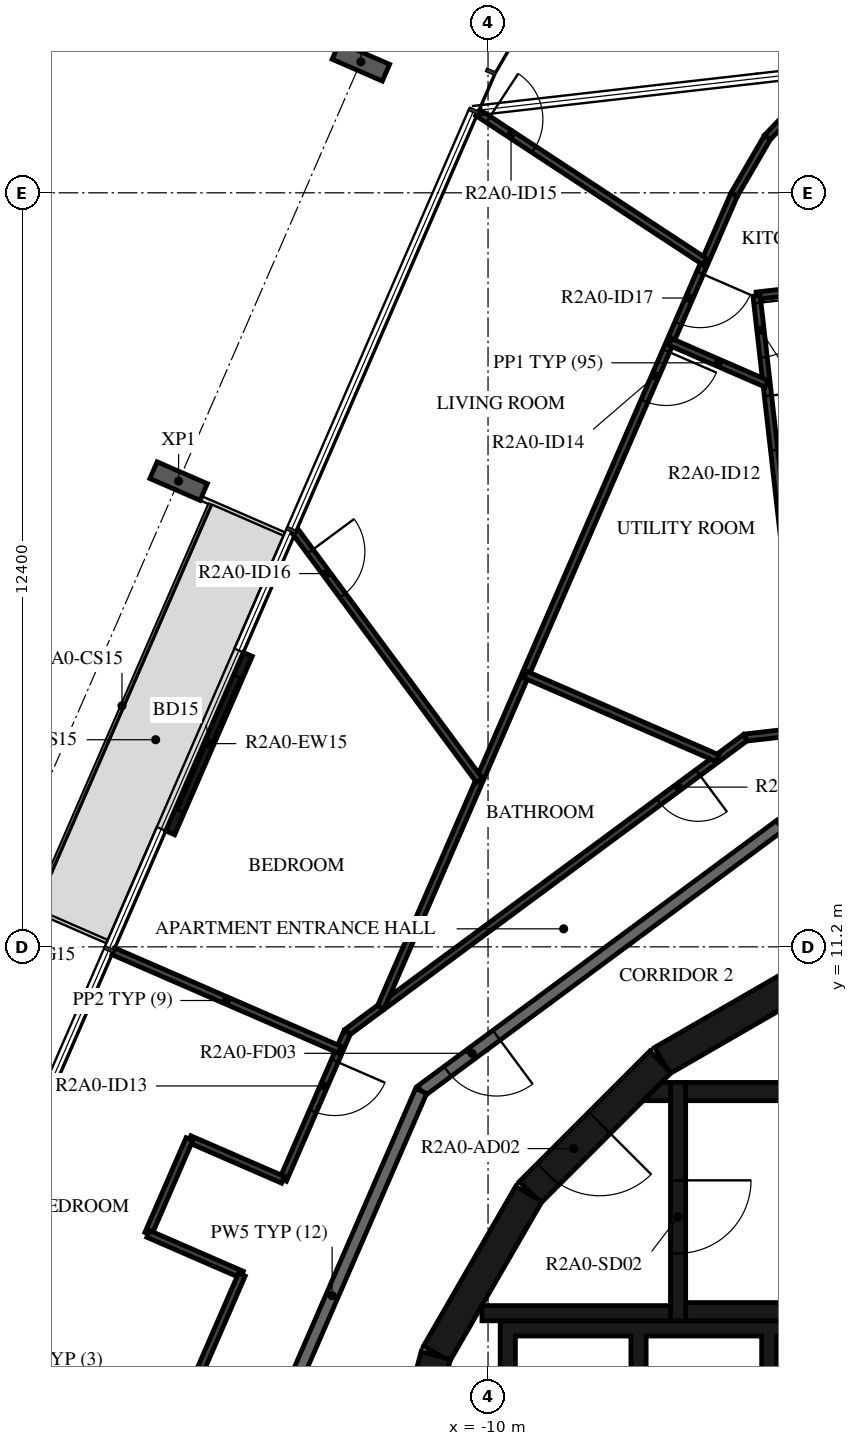
"""IFC4 building model, lengths in metres.
Left out: names, types, materials, properties, quantities, classifications, styles, units other than length and angle.
Written with IfcOpenShell. Run it as: python <this file> out.ifc"""

import sys

from ifc_helpers import new_model, si_unit, direction, frame, frame_2d, origin, origin_2d, place, context, subcontext, project, spatial, polyline, rectangle, i_section, outline, extrude, element, fill, save


model = new_model("IFC4")
c1 = context("Model", 3, precision=1e-05, world=origin(), true_north=direction((0.0, 1.0)))
c2 = subcontext(c1, "Body", "Model", "MODEL_VIEW")
j1 = project(units=[si_unit("LENGTHUNIT", "METRE"), si_unit("PLANEANGLEUNIT", "RADIAN")], contexts=[c1])
p1 = place(None, origin())
s1 = spatial("IfcSite", under=j1, at=p1, CompositionType="ELEMENT")
p2 = place(p1, origin())
s2 = spatial("IfcBuilding", under=s1, at=p2, CompositionType="ELEMENT")
p3 = place(p2, frame((0.0, 0.0, 83.7)))
s3 = spatial("IfcBuildingStorey", under=s2, at=p3, CompositionType="ELEMENT", Elevation=83.7)
for number, where, z_axis, x_axis in (
    (1, (-12.091, 25.754, -0.38), (0.0, 0.0, 1.0), (0.399, 0.917, 0.0)),
    (2, (-15.089, 18.859, -0.38), (0.0, 0.0, 1.0), (0.399, 0.917, 0.0)),
):
    element("IfcColumn", number, at=place(p3, frame(where, z_axis=z_axis, x_axis=x_axis)), inside=s3, PredefinedType="COLUMN", context=c2, shape_type="SweptSolid", body=[
        extrude(i_section(OverallWidth=0.3, OverallDepth=0.9, WebThickness=0.019, FlangeThickness=0.035, FilletRadius=0.03, at=origin_2d()), origin(), (0.0, 0.0, 1.0), 3.5),
    ])
p4 = place(p3, frame((-13.951, 16.01, 0.0), z_axis=(0.0, 0.0, 1.0), x_axis=(-0.398720531764, -0.917072482168, 0.0)))
e3 = element("IfcWall", 3, at=p4, inside=s3, PredefinedType="STANDARD", context=c2, shape_type="SweptSolid", body=[
    extrude(rectangle(XDim=3.2, YDim=0.16, at=frame_2d((1.6, 0.0))), origin(), (0.0, 0.0, 1.0), 3.12),
])
p5 = place(p4, frame((0.4, 0.0, 0.0)))
e4 = element("IfcOpeningElement", 4, at=p5, cuts=e3, PredefinedType="OPENING", context=c2, shape_type="SweptSolid", body=[
    extrude(rectangle(XDim=2.4, YDim=2.4, at=frame_2d((1.2, 1.2))), frame((0.0, 0.09, 0.0), z_axis=(0.0, -1.0, 0.0), x_axis=(1.0, 0.0, 0.0)), (0.0, 0.0, 1.0), 0.18),
])
p6 = place(p3, frame((-4.51, 10.845, 0.0), z_axis=(0.0, 0.0, 1.0), x_axis=(-0.865975092491, -0.500087131594, 0.0)))
e5 = element("IfcWall", 5, at=p6, inside=s3, PredefinedType="SHEAR", context=c2, shape_type="SweptSolid", body=[
    extrude(rectangle(XDim=3.033, YDim=0.5, at=frame_2d((1.516, 0.0))), origin(), (0.0, 0.0, 1.0), 3.12),
])
p7 = place(p3, frame((-7.164, 9.308, 0.0), z_axis=(0.0, 0.0, 1.0), x_axis=(-0.707106781187, -0.707106781187, 0.0)))
e6 = element("IfcWall", 6, at=p7, inside=s3, PredefinedType="SHEAR", context=c2, shape_type="SweptSolid", body=[
    extrude(rectangle(XDim=3.032, YDim=0.5, at=frame_2d((1.516, 0.0))), origin(), (0.0, 0.0, 1.0), 3.12),
])
p8 = place(p7, frame((1.416, 0.0, 0.0)))
e7 = element("IfcOpeningElement", 7, at=p8, cuts=e6, PredefinedType="OPENING", context=c2, shape_type="SweptSolid", body=[
    extrude(rectangle(XDim=1.2, YDim=2.1, at=frame_2d((0.6, 1.05))), frame((0.0, 0.26, 0.0), z_axis=(0.0, -1.0, 0.0), x_axis=(1.0, 0.0, 0.0)), (0.0, 0.0, 1.0), 0.52),
])
for number, where, z_axis, x_axis in (
    (8, (-9.329, 7.137, 0.0), (0.0, 0.0, 1.0), (-0.5, -0.866, 0.0)),
    (9, (-10.858, 4.479, 0.0), (0.0, 0.0, 1.0), (-0.259, -0.966, 0.0)),
):
    element("IfcWall", number, at=place(p3, frame(where, z_axis=z_axis, x_axis=x_axis)), inside=s3, PredefinedType="SHEAR", context=c2, shape_type="SweptSolid", body=[
        extrude(rectangle(XDim=3.033, YDim=0.5, at=frame_2d((1.516, 0.0))), origin(), (0.0, 0.0, 1.0), 3.12),
    ])
for number, where, z_axis, x_axis in (
    (10, (-6.75, 5.2, 0.0), (0.0, 0.0, 1.0), (1.0, 0.0, 0.0)),
    (11, (-6.75, 8.82, 0.0), (0.0, 0.0, 1.0), (1.0, 0.0, 0.0)),
):
    element("IfcWall", number, at=place(p3, frame(where, z_axis=z_axis, x_axis=x_axis)), inside=s3, PredefinedType="SHEAR", context=c2, shape_type="SweptSolid", body=[
        extrude(rectangle(XDim=6.75, YDim=0.3, at=frame_2d((3.375, 0.0))), origin(), (0.0, 0.0, 1.0), 3.12),
    ])
p9 = place(p3, frame((-6.875, 8.97, 0.0), z_axis=(0.0, 0.0, 1.0), x_axis=(0.0, -1.0, 0.0)))
e12 = element("IfcWall", 12, at=p9, inside=s3, PredefinedType="SHEAR", context=c2, shape_type="SweptSolid", body=[
    extrude(rectangle(XDim=3.92, YDim=0.25, at=frame_2d((1.96, 0.0))), origin(), (0.0, 0.0, 1.0), 3.12),
])
p10 = place(p9, frame((1.61, 0.0, 0.0)))
e13 = element("IfcOpeningElement", 13, at=p10, cuts=e12, PredefinedType="OPENING", context=c2, shape_type="SweptSolid", body=[
    extrude(rectangle(XDim=1.2, YDim=2.1, at=frame_2d((0.6, 1.05))), frame((0.0, 0.135, 0.0), z_axis=(0.0, -1.0, 0.0), x_axis=(1.0, 0.0, 0.0)), (0.0, 0.0, 1.0), 0.27),
])
p11 = place(p3, frame((-7.0, 5.175, 0.0), z_axis=(0.0, 0.0, 1.0), x_axis=(-1.0, 0.0, 0.0)))
e14 = element("IfcWall", 14, at=p11, inside=s3, PredefinedType="SHEAR", context=c2, shape_type="SweptSolid", body=[
    extrude(rectangle(XDim=3.1, YDim=0.25, at=frame_2d((1.55, 0.0))), origin(), (0.0, 0.0, 1.0), 3.12),
])
p12 = place(p3, origin())
e15 = element("IfcWall", 15, at=p12, inside=s3, PredefinedType="SHEAR", context=c2, shape_type="SweptSolid", body=[
    extrude(outline(polyline([(-7.148, 8.97), (-7.0, 8.97), (-7.0, 8.67), (-7.448, 8.67), (-7.148, 8.97)])), origin(), (0.0, 0.0, 1.0), 3.12),
])
p13 = place(p3, origin())
e16 = element("IfcWall", 16, at=p13, inside=s3, PredefinedType="SHEAR", context=c2, shape_type="SweptSolid", body=[
    extrude(outline(polyline([(-9.55, 4.8), (-7.65, 4.8), (-7.65, 1.9), (-7.4, 1.9), (-7.4, 4.8), (-5.5, 4.8), (-5.5, 1.9), (-5.25, 1.9), (-5.25, 4.8), (-3.35, 4.8), (-3.35, 1.9), (-3.1, 1.9), (-3.1, 4.8), (-1.2, 4.8), (-1.2, 1.9), (-0.95, 1.9), (-0.95, 4.8), (3.1, 4.8), (3.1, 1.9), (3.35, 1.9), (3.35, 4.8), (5.25, 4.8), (5.25, 1.9), (5.5, 1.9), (5.5, 4.8), (7.4, 4.8), (7.4, 1.9), (7.65, 1.9), (7.65, 4.8), (9.55, 4.8), (9.55, 1.9), (9.8, 1.9), (9.8, 4.8), (9.8, 5.05), (-9.8, 5.05), (-9.8, 4.8), (-9.8, 1.9), (-9.55, 1.9), (-9.55, 4.8)])), origin(), (0.0, 0.0, 1.0), 3.12),
])
p14 = place(p3, frame((-5.198, 13.196, 0.0), z_axis=(0.0, 0.0, 1.0), x_axis=(-0.803869883159, -0.594805187394, 0.0)))
e17 = element("IfcWall", 17, at=p14, inside=s3, PredefinedType="STANDARD", context=c2, shape_type="SweptSolid", body=[
    extrude(rectangle(XDim=7.342, YDim=0.2, at=frame_2d((3.671, 0.0))), origin(), (0.0, 0.0, 1.0), 3.12),
])
p15 = place(p14, frame((5.8, 0.0, 0.0)))
e18 = element("IfcOpeningElement", 18, at=p15, cuts=e17, PredefinedType="OPENING", context=c2, shape_type="SweptSolid", body=[
    extrude(rectangle(XDim=1.0, YDim=2.1, at=frame_2d((0.5, 1.05))), frame((0.0, 0.11, 0.0), z_axis=(0.0, -1.0, 0.0), x_axis=(1.0, 0.0, 0.0)), (0.0, 0.0, 1.0), 0.22),
])
p16 = place(p3, frame((-11.1, 8.829, 0.0), z_axis=(0.0, 0.0, 1.0), x_axis=(-0.398741918631, -0.917063183388, 0.0)))
e19 = element("IfcWall", 19, at=p16, inside=s3, PredefinedType="STANDARD", context=c2, shape_type="SweptSolid", body=[
    extrude(rectangle(XDim=7.342, YDim=0.2, at=frame_2d((3.671, 0.0))), origin(), (0.0, 0.0, 1.0), 3.12),
])
p17 = place(p3, frame((-19.159, 4.231, 0.0), z_axis=(0.0, 0.0, 1.0), x_axis=(0.91704996524, -0.398772317562, 0.0)))
e20 = element("IfcWall", 20, at=p17, inside=s3, PredefinedType="STANDARD", context=c2, shape_type="SweptSolid", body=[
    extrude(rectangle(XDim=4.057, YDim=0.2, at=frame_2d((2.029, 0.0))), origin(), (0.0, 0.0, 1.0), 2.73),
])
p18 = place(p3, frame((-3.999, 22.089, 0.0), z_axis=(0.0, 0.0, 1.0), x_axis=(-0.993550908639, -0.113386912568, 0.0)))
e21 = element("IfcWall", 21, at=p18, inside=s3, PredefinedType="PARTITIONING", context=c2, shape_type="SweptSolid", body=[
    extrude(rectangle(XDim=1.595, YDim=0.12, at=frame_2d((0.798, 0.0))), origin(), (0.0, 0.0, 1.0), 3.12),
])
p19 = place(p3, frame((-5.584, 21.908, 0.0), z_axis=(0.0, 0.0, 1.0), x_axis=(0.113192725021, -0.993573050662, 0.0)))
e22 = element("IfcWall", 22, at=p19, inside=s3, PredefinedType="PARTITIONING", context=c2, shape_type="SweptSolid", body=[
    extrude(rectangle(XDim=7.2, YDim=0.12, at=frame_2d((3.6, 0.0))), origin(), (0.0, 0.0, 1.0), 3.12),
])
p20 = place(p19, frame((0.12, 0.0, 0.0)))
e23 = element("IfcOpeningElement", 23, at=p20, cuts=e22, PredefinedType="OPENING", context=c2, shape_type="SweptSolid", body=[
    extrude(rectangle(XDim=0.9, YDim=2.1, at=frame_2d((0.45, 1.05))), frame((0.0, 0.07, 0.0), z_axis=(0.0, -1.0, 0.0), x_axis=(1.0, 0.0, 0.0)), (0.0, 0.0, 1.0), 0.14),
])
p21 = place(p19, frame((1.658, 0.0, 0.0)))
e24 = element("IfcOpeningElement", 24, at=p21, cuts=e22, PredefinedType="OPENING", context=c2, shape_type="SweptSolid", body=[
    extrude(rectangle(XDim=0.9, YDim=2.1, at=frame_2d((0.45, 1.05))), frame((0.0, 0.07, 0.0), z_axis=(0.0, -1.0, 0.0), x_axis=(1.0, 0.0, 0.0)), (0.0, 0.0, 1.0), 0.14),
])
p22 = place(p3, frame((-4.769, 14.755, 0.0), z_axis=(0.0, 0.0, 1.0), x_axis=(-0.993568649539, -0.113231350131, 0.0)))
e25 = element("IfcWall", 25, at=p22, inside=s3, PredefinedType="PARTITIONING", context=c2, shape_type="SweptSolid", body=[
    extrude(rectangle(XDim=1.005, YDim=0.12, at=frame_2d((0.502, 0.0))), origin(), (0.0, 0.0, 1.0), 3.12),
])
p23 = place(p3, frame((-5.767, 14.641, 0.0), z_axis=(0.0, 0.0, 1.0), x_axis=(-0.803853364238, -0.594827511807, 0.0)))
e26 = element("IfcWall", 26, at=p23, inside=s3, PredefinedType="PARTITIONING", context=c2, shape_type="SweptSolid", body=[
    extrude(rectangle(XDim=8.146, YDim=0.12, at=frame_2d((4.073, 0.0))), origin(), (0.0, 0.0, 1.0), 3.12),
])
p24 = place(p23, frame((0.97, 0.0, 0.0)))
e27 = element("IfcOpeningElement", 27, at=p24, cuts=e26, PredefinedType="OPENING", context=c2, shape_type="SweptSolid", body=[
    extrude(rectangle(XDim=0.8, YDim=2.1, at=frame_2d((0.4, 1.05))), frame((0.0, 0.07, 0.0), z_axis=(0.0, -1.0, 0.0), x_axis=(1.0, 0.0, 0.0)), (0.0, 0.0, 1.0), 0.14),
])
p25 = place(p3, frame((-12.315, 9.796, 0.0), z_axis=(0.0, 0.0, 1.0), x_axis=(-0.398790200406, -0.917042188812, 0.0)))
e28 = element("IfcWall", 28, at=p25, inside=s3, PredefinedType="PARTITIONING", context=c2, shape_type="SweptSolid", body=[
    extrude(rectangle(XDim=2.646, YDim=0.12, at=frame_2d((1.323, 0.0))), origin(), (0.0, 0.0, 1.0), 3.12),
])
p26 = place(p25, frame((0.513, 0.0, 0.0)))
e29 = element("IfcOpeningElement", 29, at=p26, cuts=e28, PredefinedType="OPENING", context=c2, shape_type="SweptSolid", body=[
    extrude(rectangle(XDim=0.9, YDim=2.1, at=frame_2d((0.45, 1.05))), frame((0.0, 0.07, 0.0), z_axis=(0.0, -1.0, 0.0), x_axis=(1.0, 0.0, 0.0)), (0.0, 0.0, 1.0), 0.14),
])
p27 = place(p3, frame((-13.371, 7.369, 0.0), z_axis=(0.0, 0.0, 1.0), x_axis=(-0.917109358393, 0.398635704306, 0.0)))
e30 = element("IfcWall", 30, at=p27, inside=s3, PredefinedType="PARTITIONING", context=c2, shape_type="SweptSolid", body=[
    extrude(rectangle(XDim=1.679, YDim=0.12, at=frame_2d((0.839, 0.0))), origin(), (0.0, 0.0, 1.0), 3.12),
])
p28 = place(p3, frame((-14.91, 8.038, 0.0), z_axis=(0.0, 0.0, 1.0), x_axis=(-0.398715607479, -0.91707462311, 0.0)))
e31 = element("IfcWall", 31, at=p28, inside=s3, PredefinedType="PARTITIONING", context=c2, shape_type="SweptSolid", body=[
    extrude(rectangle(XDim=1.7, YDim=0.12, at=frame_2d((0.85, 0.0))), origin(), (0.0, 0.0, 1.0), 3.12),
])
p29 = place(p3, frame((-15.588, 6.479, 0.0), z_axis=(0.0, 0.0, 1.0), x_axis=(0.917033055073, -0.398811203332, 0.0)))
e32 = element("IfcWall", 32, at=p29, inside=s3, PredefinedType="PARTITIONING", context=c2, shape_type="SweptSolid", body=[
    extrude(rectangle(XDim=1.678, YDim=0.12, at=frame_2d((0.839, 0.0))), origin(), (0.0, 0.0, 1.0), 3.12),
])
p30 = place(p3, frame((-14.049, 5.81, 0.0), z_axis=(0.0, 0.0, 1.0), x_axis=(-0.398707311688, -0.917078229818, 0.0)))
e33 = element("IfcWall", 33, at=p30, inside=s3, PredefinedType="PARTITIONING", context=c2, shape_type="SweptSolid", body=[
    extrude(rectangle(XDim=3.799, YDim=0.12, at=frame_2d((1.899, 0.0))), origin(), (0.0, 0.0, 1.0), 3.12),
])
p31 = place(p3, frame((-4.835, 25.112, 0.0), z_axis=(0.0, 0.0, 1.0), x_axis=(-0.688463067416, -0.72527140079, 0.0)))
e34 = element("IfcWall", 34, at=p31, inside=s3, PredefinedType="PARTITIONING", context=c2, shape_type="SweptSolid", body=[
    extrude(rectangle(XDim=0.829, YDim=0.12, at=frame_2d((0.415, 0.0))), origin(), (0.0, 0.0, 1.0), 3.12),
])
p32 = place(p3, frame((-5.406, 24.51, 0.0), z_axis=(0.0, 0.0, 1.0), x_axis=(-0.502487709822, -0.864584351858, 0.0)))
e35 = element("IfcWall", 35, at=p32, inside=s3, PredefinedType="PARTITIONING", context=c2, shape_type="SweptSolid", body=[
    extrude(rectangle(XDim=1.087, YDim=0.12, at=frame_2d((0.543, 0.0))), origin(), (0.0, 0.0, 1.0), 3.12),
])
p33 = place(p3, frame((-5.952, 23.571, 0.0), z_axis=(0.0, 0.0, 1.0), x_axis=(-0.398745097158, -0.917061801348, 0.0)))
e36 = element("IfcWall", 36, at=p33, inside=s3, PredefinedType="PARTITIONING", context=c2, shape_type="SweptSolid", body=[
    extrude(rectangle(XDim=14.576, YDim=0.12, at=frame_2d((7.288, 0.0))), origin(), (0.0, 0.0, 1.0), 3.12),
])
p34 = place(p33, frame((2.801, 0.0, 0.0)))
e37 = element("IfcOpeningElement", 37, at=p34, cuts=e36, PredefinedType="OPENING", context=c2, shape_type="SweptSolid", body=[
    extrude(rectangle(XDim=0.9, YDim=2.1, at=frame_2d((0.45, 1.05))), frame((0.0, 0.07, 0.0), z_axis=(0.0, -1.0, 0.0), x_axis=(1.0, 0.0, 0.0)), (0.0, 0.0, 1.0), 0.14),
])
p35 = place(p33, frame((1.405, 0.0, 0.0)))
e38 = element("IfcOpeningElement", 38, at=p35, cuts=e36, PredefinedType="OPENING", context=c2, shape_type="SweptSolid", body=[
    extrude(rectangle(XDim=0.9, YDim=2.1, at=frame_2d((0.45, 1.05))), frame((0.0, 0.07, 0.0), z_axis=(0.0, -1.0, 0.0), x_axis=(1.0, 0.0, 0.0)), (0.0, 0.0, 1.0), 0.14),
])
p36 = place(p3, frame((-7.005, 21.149, 0.0), z_axis=(0.0, 0.0, 1.0), x_axis=(0.917081274718, -0.398700307953, 0.0)))
e39 = element("IfcWall", 39, at=p36, inside=s3, PredefinedType="PARTITIONING", context=c2, shape_type="SweptSolid", body=[
    extrude(rectangle(XDim=1.73, YDim=0.12, at=frame_2d((0.865, 0.0))), origin(), (0.0, 0.0, 1.0), 3.12),
])
p37 = place(p3, frame((-10.165, 24.917, 0.0), z_axis=(0.0, 0.0, 1.0), x_axis=(0.835849562932, -0.548958566876, 0.0)))
e40 = element("IfcWall", 40, at=p37, inside=s3, PredefinedType="PARTITIONING", context=c2, shape_type="SweptSolid", body=[
    extrude(rectangle(XDim=4.465, YDim=0.12, at=frame_2d((2.232, 0.0))), origin(), (0.0, 0.0, 1.0), 2.73),
])
p38 = place(p37, frame((0.2, 0.0, 0.0)))
e41 = element("IfcOpeningElement", 41, at=p38, cuts=e40, PredefinedType="OPENING", context=c2, shape_type="SweptSolid", body=[
    extrude(rectangle(XDim=0.9, YDim=2.1, at=frame_2d((0.45, 1.05))), frame((0.0, 0.07, 0.0), z_axis=(0.0, -1.0, 0.0), x_axis=(1.0, 0.0, 0.0)), (0.0, 0.0, 1.0), 0.14),
])
p39 = place(p3, frame((-9.385, 15.676, 0.0), z_axis=(0.0, 0.0, 1.0), x_axis=(0.917068929701, -0.398728702475, 0.0)))
e42 = element("IfcWall", 42, at=p39, inside=s3, PredefinedType="PARTITIONING", context=c2, shape_type="SweptSolid", body=[
    extrude(rectangle(XDim=3.445, YDim=0.12, at=frame_2d((1.723, 0.0))), origin(), (0.0, 0.0, 1.0), 3.12),
])
p40 = place(p3, frame((-13.163, 18.022, 0.0), z_axis=(0.0, 0.0, 1.0), x_axis=(0.594797671626, -0.803875444226, 0.0)))
e43 = element("IfcWall", 43, at=p40, inside=s3, PredefinedType="PARTITIONING", context=c2, shape_type="SweptSolid", body=[
    extrude(rectangle(XDim=5.081, YDim=0.12, at=frame_2d((2.54, 0.0))), origin(), (0.0, 0.0, 1.0), 3.12),
])
p41 = place(p40, frame((0.4, 0.0, 0.0)))
e44 = element("IfcOpeningElement", 44, at=p41, cuts=e43, PredefinedType="OPENING", context=c2, shape_type="SweptSolid", body=[
    extrude(rectangle(XDim=0.9, YDim=2.1, at=frame_2d((0.45, 1.05))), frame((0.0, 0.07, 0.0), z_axis=(0.0, -1.0, 0.0), x_axis=(1.0, 0.0, 0.0)), (0.0, 0.0, 1.0), 0.14),
])
p42 = place(p3, frame((-16.161, 11.126, 0.0), z_axis=(0.0, 0.0, 1.0), x_axis=(0.91705953326, -0.398750313425, 0.0)))
e45 = element("IfcWall", 45, at=p42, inside=s3, PredefinedType="PARTITIONING", context=c2, shape_type="SweptSolid", body=[
    extrude(rectangle(XDim=4.057, YDim=0.12, at=frame_2d((2.029, 0.0))), origin(), (0.0, 0.0, 1.0), 2.73),
])
p43 = place(p5, origin())
e46 = element("IfcDoor", 46, at=p43, inside=s3, OperationType="DOUBLE_DOOR_SLIDING", PredefinedType="DOOR", context=c2, shape_type="SweptSolid", body=[
    extrude(rectangle(XDim=2.4, YDim=2.4, at=frame_2d((1.2, 1.2))), frame((0.0, 0.025, 0.0), z_axis=(0.0, -1.0, 0.0), x_axis=(1.0, 0.0, 0.0)), (0.0, 0.0, 1.0), 0.05),
])
fill(e4, e46)
p44 = place(p10, origin())
e47 = element("IfcDoor", 47, at=p44, inside=s3, OperationType="SINGLE_SWING_LEFT", PredefinedType="DOOR", context=c2, shape_type="SweptSolid", body=[
    extrude(rectangle(XDim=1.2, YDim=2.1, at=frame_2d((0.6, 1.05))), frame((0.0, 0.025, 0.0), z_axis=(0.0, -1.0, 0.0), x_axis=(1.0, 0.0, 0.0)), (0.0, 0.0, 1.0), 0.05),
])
fill(e13, e47)
p45 = place(p8, origin())
e48 = element("IfcDoor", 48, at=p45, inside=s3, OperationType="SINGLE_SWING_RIGHT", PredefinedType="DOOR", context=c2, shape_type="SweptSolid", body=[
    extrude(rectangle(XDim=1.2, YDim=2.1, at=frame_2d((0.6, 1.05))), frame((0.0, 0.025, 0.0), z_axis=(0.0, -1.0, 0.0), x_axis=(1.0, 0.0, 0.0)), (0.0, 0.0, 1.0), 0.05),
])
fill(e7, e48)
p46 = place(p15, origin())
e49 = element("IfcDoor", 49, at=p46, inside=s3, OperationType="SINGLE_SWING_LEFT", PredefinedType="DOOR", context=c2, shape_type="SweptSolid", body=[
    extrude(rectangle(XDim=1.0, YDim=2.1, at=frame_2d((0.5, 1.05))), frame((0.0, 0.025, 0.0), z_axis=(0.0, -1.0, 0.0), x_axis=(1.0, 0.0, 0.0)), (0.0, 0.0, 1.0), 0.05),
])
fill(e18, e49)
p47 = place(p20, origin())
e50 = element("IfcDoor", 50, at=p47, inside=s3, OperationType="SINGLE_SWING_RIGHT", PredefinedType="DOOR", context=c2, shape_type="SweptSolid", body=[
    extrude(rectangle(XDim=0.9, YDim=2.1, at=frame_2d((0.45, 1.05))), frame((0.0, 0.025, 0.0), z_axis=(0.0, -1.0, 0.0), x_axis=(1.0, 0.0, 0.0)), (0.0, 0.0, 1.0), 0.05),
])
fill(e23, e50)
p48 = place(p21, origin())
e51 = element("IfcDoor", 51, at=p48, inside=s3, OperationType="SINGLE_SWING_LEFT", PredefinedType="DOOR", context=c2, shape_type="SweptSolid", body=[
    extrude(rectangle(XDim=0.9, YDim=2.1, at=frame_2d((0.45, 1.05))), frame((0.0, 0.025, 0.0), z_axis=(0.0, -1.0, 0.0), x_axis=(1.0, 0.0, 0.0)), (0.0, 0.0, 1.0), 0.05),
])
fill(e24, e51)
p49 = place(p24, origin())
e52 = element("IfcDoor", 52, at=p49, inside=s3, OperationType="SINGLE_SWING_LEFT", PredefinedType="DOOR", context=c2, shape_type="SweptSolid", body=[
    extrude(rectangle(XDim=0.8, YDim=2.1, at=frame_2d((0.4, 1.05))), frame((0.0, 0.025, 0.0), z_axis=(0.0, -1.0, 0.0), x_axis=(1.0, 0.0, 0.0)), (0.0, 0.0, 1.0), 0.05),
])
fill(e27, e52)
p50 = place(p26, origin())
e53 = element("IfcDoor", 53, at=p50, inside=s3, OperationType="SINGLE_SWING_LEFT", PredefinedType="DOOR", context=c2, shape_type="SweptSolid", body=[
    extrude(rectangle(XDim=0.9, YDim=2.1, at=frame_2d((0.45, 1.05))), frame((0.0, 0.025, 0.0), z_axis=(0.0, -1.0, 0.0), x_axis=(1.0, 0.0, 0.0)), (0.0, 0.0, 1.0), 0.05),
])
fill(e29, e53)
p51 = place(p34, origin())
e54 = element("IfcDoor", 54, at=p51, inside=s3, OperationType="SINGLE_SWING_LEFT", PredefinedType="DOOR", context=c2, shape_type="SweptSolid", body=[
    extrude(rectangle(XDim=0.9, YDim=2.1, at=frame_2d((0.45, 1.05))), frame((0.0, 0.025, 0.0), z_axis=(0.0, -1.0, 0.0), x_axis=(1.0, 0.0, 0.0)), (0.0, 0.0, 1.0), 0.05),
])
fill(e37, e54)
p52 = place(p38, origin())
e55 = element("IfcDoor", 55, at=p52, inside=s3, OperationType="SINGLE_SWING_LEFT", PredefinedType="DOOR", context=c2, shape_type="SweptSolid", body=[
    extrude(rectangle(XDim=0.9, YDim=2.1, at=frame_2d((0.45, 1.05))), frame((0.0, 0.025, 0.0), z_axis=(0.0, -1.0, 0.0), x_axis=(1.0, 0.0, 0.0)), (0.0, 0.0, 1.0), 0.05),
])
fill(e41, e55)
p53 = place(p41, origin())
e56 = element("IfcDoor", 56, at=p53, inside=s3, OperationType="SINGLE_SWING_RIGHT", PredefinedType="DOOR", context=c2, shape_type="SweptSolid", body=[
    extrude(rectangle(XDim=0.9, YDim=2.1, at=frame_2d((0.45, 1.05))), frame((0.0, 0.025, 0.0), z_axis=(0.0, -1.0, 0.0), x_axis=(1.0, 0.0, 0.0)), (0.0, 0.0, 1.0), 0.05),
])
fill(e44, e56)
p54 = place(p35, origin())
e57 = element("IfcDoor", 57, at=p54, inside=s3, OperationType="SINGLE_SWING_RIGHT", PredefinedType="DOOR", context=c2, shape_type="SweptSolid", body=[
    extrude(rectangle(XDim=0.9, YDim=2.1, at=frame_2d((0.45, 1.05))), frame((0.0, 0.025, 0.0), z_axis=(0.0, -1.0, 0.0), x_axis=(1.0, 0.0, 0.0)), (0.0, 0.0, 1.0), 0.05),
])
fill(e38, e57)
save(model, sys.argv[1])
